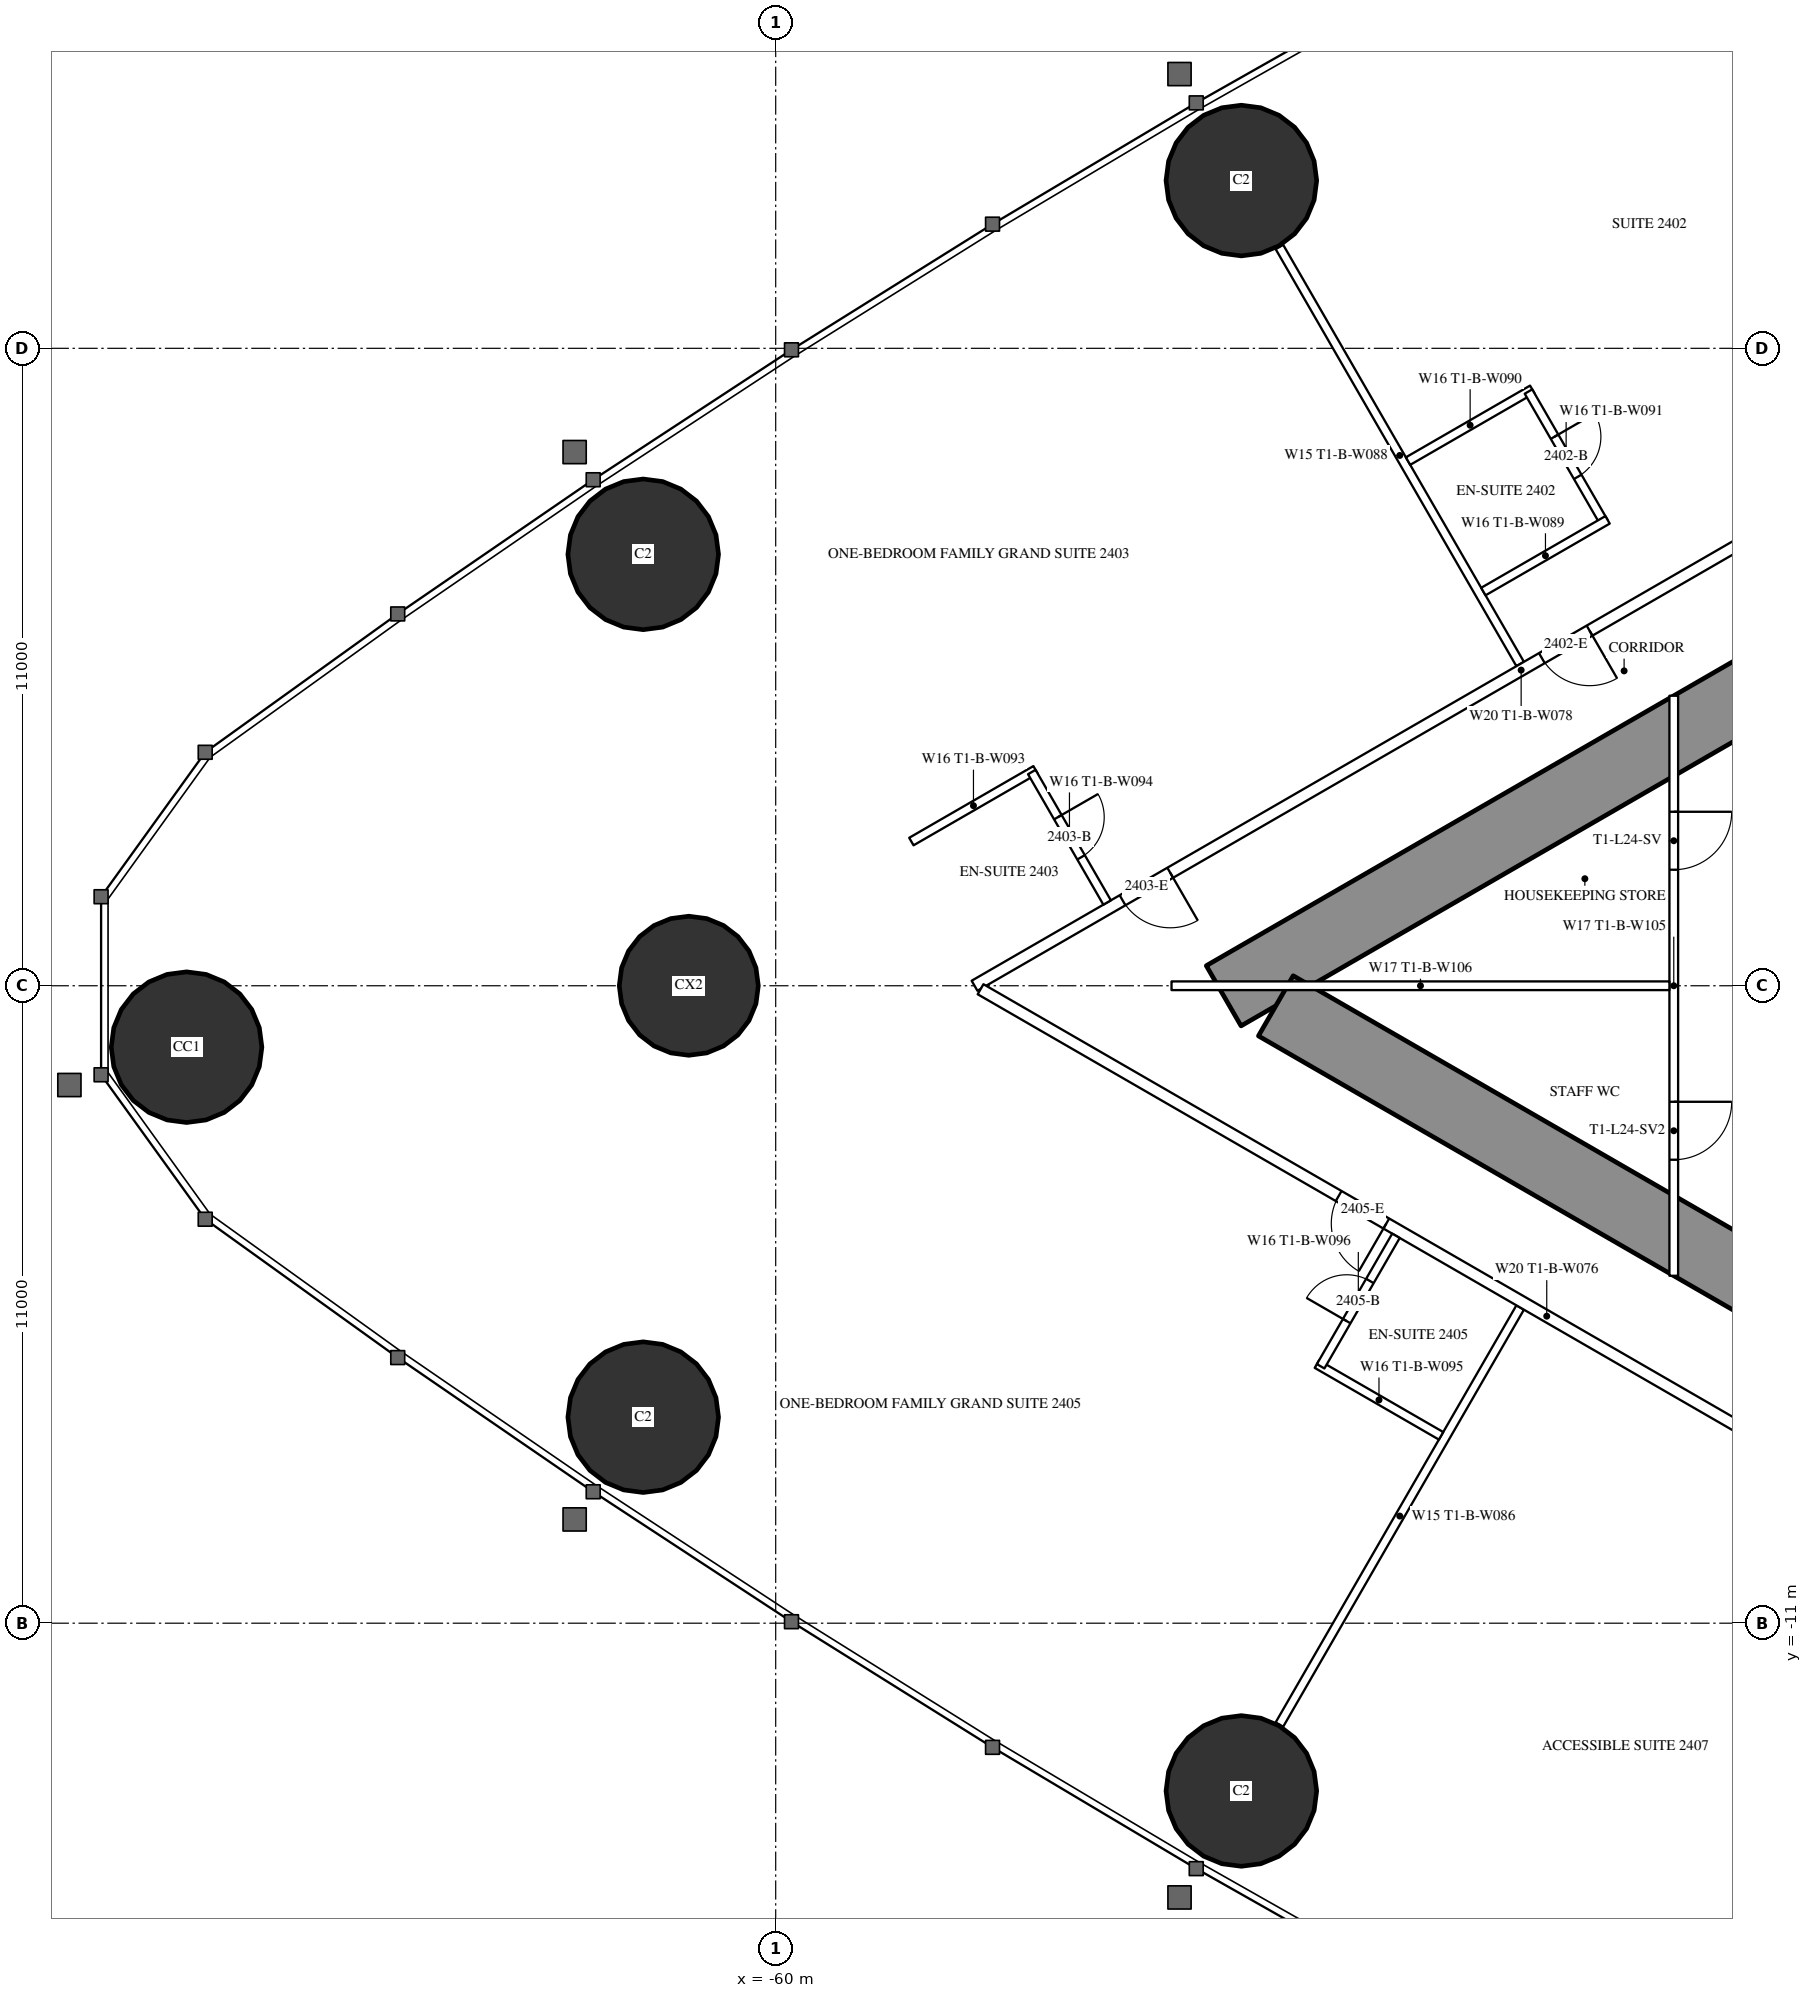
"""IFC4 building model, lengths in metres.
Left out: names, types, materials, properties, quantities, classifications, styles, units other than length and angle.
Written with IfcOpenShell. Run it as: python <this file> out.ifc"""

import sys

from ifc_helpers import new_model, si_unit, direction, frame, frame_2d, origin, origin_2d, place, context, subcontext, project, spatial, rectangle, circle, hollow_circle, extrude, element, fill, save


model = new_model("IFC4")
c1 = context("Model", 3, precision=1e-05, world=origin(), true_north=direction((0.0, 1.0)))
c2 = subcontext(c1, "Body", "Model", "MODEL_VIEW")
j1 = project(units=[si_unit("LENGTHUNIT", "METRE"), si_unit("PLANEANGLEUNIT", "RADIAN")], contexts=[c1])
p1 = place(None, origin())
s1 = spatial("IfcSite", under=j1, at=p1, CompositionType="ELEMENT")
p2 = place(p1, origin())
s2 = spatial("IfcBuilding", under=s1, at=p2, CompositionType="ELEMENT")
p3 = place(p2, frame((0.0, 0.0, 94.1)))
s3 = spatial("IfcBuildingStorey", under=s2, at=p3, CompositionType="ELEMENT", Elevation=94.1)
for number, where, z_axis, x_axis in (
    (1, (-70.168, -1.06, 0.0), (0.0, 0.0, 1.0), (1.0, 0.0, 0.0)),
    (2, (-62.287, -7.445, 0.0), (0.0, 0.0, 1.0), (1.0, 0.0, 0.0)),
    (3, (-51.963, -13.895, 0.0), (0.0, 0.0, 1.0), (1.0, 0.0, 0.0)),
    (4, (-51.963, 13.895, 0.0), (0.0, 0.0, 1.0), (1.0, 0.0, 0.0)),
    (5, (-62.287, 7.445, 0.0), (0.0, 0.0, 1.0), (1.0, 0.0, 0.0)),
):
    element("IfcColumn", number, at=place(p3, frame(where, z_axis=z_axis, x_axis=x_axis)), inside=s3, PredefinedType="COLUMN", context=c2, shape_type="SweptSolid", body=[
        extrude(hollow_circle(Radius=1.3, WallThickness=0.1, at=origin_2d()), origin(), (0.0, 0.0, 1.0), 3.5),
    ])
p4 = place(p3, frame((-61.5, 0.0, 0.0), z_axis=(0.0, 0.0, 1.0), x_axis=(1.0, 0.0, 0.0)))
e6 = element("IfcColumn", 6, at=p4, inside=s3, PredefinedType="COLUMN", context=c2, shape_type="SweptSolid", body=[
    extrude(circle(Radius=1.2, at=origin_2d()), origin(), (0.0, 0.0, 1.0), 3.5),
])
p5 = place(p3, frame((-27.2, 14.3, 0.0), z_axis=(0.0, 0.0, 1.0), x_axis=(-0.866026593062, -0.499997940104, 0.0)))
e7 = element("IfcWall", 7, at=p5, inside=s3, PredefinedType="SHEAR", context=c2, shape_type="SweptSolid", body=[
    extrude(rectangle(XDim=28.946, YDim=1.2, at=frame_2d((14.473, 0.0))), origin(), (0.0, 0.0, 1.0), 3.5),
])
p6 = place(p5, frame((4.6, 0.0, 0.0)))
e8 = element("IfcOpeningElement", 8, at=p6, cuts=e7, PredefinedType="OPENING", context=c2, shape_type="SweptSolid", body=[
    extrude(rectangle(XDim=1.0, YDim=2.2, at=frame_2d((0.5, 1.1))), frame((0.0, 0.61, 0.0), z_axis=(0.0, -1.0, 0.0), x_axis=(1.0, 0.0, 0.0)), (0.0, 0.0, 1.0), 1.22),
])
p7 = place(p5, frame((13.395, 0.0, 0.0)))
e9 = element("IfcOpeningElement", 9, at=p7, cuts=e7, PredefinedType="OPENING", context=c2, shape_type="SweptSolid", body=[
    extrude(rectangle(XDim=1.8, YDim=2.2, at=frame_2d((0.9, 1.1))), frame((0.0, 0.61, 0.0), z_axis=(0.0, -1.0, 0.0), x_axis=(1.0, 0.0, 0.0)), (0.0, 0.0, 1.0), 1.22),
])
p8 = place(p3, frame((-27.2, -14.3, 0.0), z_axis=(0.0, 0.0, 1.0), x_axis=(-0.866024021859, 0.500002393557, 0.0)))
e10 = element("IfcWall", 10, at=p8, inside=s3, PredefinedType="SHEAR", context=c2, shape_type="SweptSolid", body=[
    extrude(rectangle(XDim=27.907, YDim=1.2, at=frame_2d((13.954, 0.0))), origin(), (0.0, 0.0, 1.0), 3.5),
])
p9 = place(p8, frame((4.6, 0.0, 0.0)))
e11 = element("IfcOpeningElement", 11, at=p9, cuts=e10, PredefinedType="OPENING", context=c2, shape_type="SweptSolid", body=[
    extrude(rectangle(XDim=1.0, YDim=2.2, at=frame_2d((0.5, 1.1))), frame((0.0, 0.61, 0.0), z_axis=(0.0, -1.0, 0.0), x_axis=(1.0, 0.0, 0.0)), (0.0, 0.0, 1.0), 1.22),
])
p10 = place(p8, frame((13.395, 0.0, 0.0)))
e12 = element("IfcOpeningElement", 12, at=p10, cuts=e10, PredefinedType="OPENING", context=c2, shape_type="SweptSolid", body=[
    extrude(rectangle(XDim=1.8, YDim=2.2, at=frame_2d((0.9, 1.1))), frame((0.0, 0.61, 0.0), z_axis=(0.0, -1.0, 0.0), x_axis=(1.0, 0.0, 0.0)), (0.0, 0.0, 1.0), 1.22),
])
for number, where, z_axis, x_axis in (
    (13, (-47.151, 5.552, 0.0), (0.0, 0.0, 1.0), (-0.5, 0.866, 0.0)),
    (14, (-47.151, -5.552, 0.0), (0.0, 0.0, 1.0), (-0.5, -0.866, 0.0)),
):
    element("IfcWall", number, at=place(p3, frame(where, z_axis=z_axis, x_axis=x_axis)), inside=s3, PredefinedType="PARTITIONING", context=c2, shape_type="SweptSolid", body=[
        extrude(rectangle(XDim=8.311, YDim=0.15, at=frame_2d((4.156, 0.0))), origin(), (0.0, 0.0, 1.0), 2.2),
    ])
p11 = place(p3, frame((-37.7, 10.894, 0.0), z_axis=(0.0, 0.0, 1.0), x_axis=(-0.866027905338, -0.499995667157, 0.0)))
e15 = element("IfcWall", 15, at=p11, inside=s3, PredefinedType="PARTITIONING", context=c2, shape_type="SweptSolid", body=[
    extrude(rectangle(XDim=21.787, YDim=0.2, at=frame_2d((10.894, 0.0))), origin(), (0.0, 0.0, 1.0), 3.25),
])
p12 = place(p11, frame((17.887, 0.0, 0.0)))
e16 = element("IfcOpeningElement", 16, at=p12, cuts=e15, PredefinedType="OPENING", context=c2, shape_type="SweptSolid", body=[
    extrude(rectangle(XDim=0.95, YDim=2.2, at=frame_2d((0.475, 1.1))), frame((0.0, 0.11, 0.0), z_axis=(0.0, -1.0, 0.0), x_axis=(1.0, 0.0, 0.0)), (0.0, 0.0, 1.0), 0.22),
])
p13 = place(p11, frame((9.531, 0.0, 0.0)))
e17 = element("IfcOpeningElement", 17, at=p13, cuts=e15, PredefinedType="OPENING", context=c2, shape_type="SweptSolid", body=[
    extrude(rectangle(XDim=0.95, YDim=2.2, at=frame_2d((0.475, 1.1))), frame((0.0, 0.11, 0.0), z_axis=(0.0, -1.0, 0.0), x_axis=(1.0, 0.0, 0.0)), (0.0, 0.0, 1.0), 0.22),
])
p14 = place(p3, frame((-36.92, -11.344, 0.0), z_axis=(0.0, 0.0, 1.0), x_axis=(-0.866028313256, 0.499994960614, 0.0)))
e18 = element("IfcWall", 18, at=p14, inside=s3, PredefinedType="PARTITIONING", context=c2, shape_type="SweptSolid", body=[
    extrude(rectangle(XDim=22.568, YDim=0.2, at=frame_2d((11.284, 0.0))), origin(), (0.0, 0.0, 1.0), 3.25),
])
p15 = place(p14, frame((14.481, 0.0, 0.0)))
e19 = element("IfcOpeningElement", 19, at=p15, cuts=e18, PredefinedType="OPENING", context=c2, shape_type="SweptSolid", body=[
    extrude(rectangle(XDim=0.95, YDim=2.2, at=frame_2d((0.475, 1.1))), frame((0.0, 0.11, 0.0), z_axis=(0.0, -1.0, 0.0), x_axis=(1.0, 0.0, 0.0)), (0.0, 0.0, 1.0), 0.22),
])
p16 = place(p14, frame((3.35, 0.0, 0.0)))
e20 = element("IfcOpeningElement", 20, at=p16, cuts=e18, PredefinedType="OPENING", context=c2, shape_type="SweptSolid", body=[
    extrude(rectangle(XDim=1.0, YDim=2.2, at=frame_2d((0.5, 1.1))), frame((0.0, 0.11, 0.0), z_axis=(0.0, -1.0, 0.0), x_axis=(1.0, 0.0, 0.0)), (0.0, 0.0, 1.0), 0.22),
])
p17 = place(p3, frame((-55.515, 3.726, 0.0), z_axis=(0.0, 0.0, 1.0), x_axis=(-0.866006523861, -0.500032699561, 0.0)))
e21 = element("IfcWall", 21, at=p17, inside=s3, PredefinedType="PARTITIONING", context=c2, shape_type="SweptSolid", body=[
    extrude(rectangle(XDim=2.475, YDim=0.15, at=frame_2d((1.237, 0.0))), origin(), (0.0, 0.0, 1.0), 3.25),
])
p18 = place(p3, frame((-54.28, 1.437, 0.0), z_axis=(0.0, 0.0, 1.0), x_axis=(-0.500006934395, 0.866021400173, 0.0)))
e22 = element("IfcWall", 22, at=p18, inside=s3, PredefinedType="PARTITIONING", context=c2, shape_type="SweptSolid", body=[
    extrude(rectangle(XDim=2.6, YDim=0.15, at=frame_2d((1.3, 0.0))), origin(), (0.0, 0.0, 1.0), 3.25),
])
p19 = place(p18, frame((0.9, 0.0, 0.0)))
e23 = element("IfcOpeningElement", 23, at=p19, cuts=e22, PredefinedType="OPENING", context=c2, shape_type="SweptSolid", body=[
    extrude(rectangle(XDim=0.8, YDim=2.2, at=frame_2d((0.4, 1.1))), frame((0.0, 0.085, 0.0), z_axis=(0.0, -1.0, 0.0), x_axis=(1.0, 0.0, 0.0)), (0.0, 0.0, 1.0), 0.17),
])
p20 = place(p3, frame((-48.516, -7.767, 0.0), z_axis=(0.0, 0.0, 1.0), x_axis=(-0.866031185235, 0.4999899861, 0.0)))
e24 = element("IfcWall", 24, at=p20, inside=s3, PredefinedType="PARTITIONING", context=c2, shape_type="SweptSolid", body=[
    extrude(rectangle(XDim=2.475, YDim=0.15, at=frame_2d((1.238, 0.0))), origin(), (0.0, 0.0, 1.0), 3.25),
])
p21 = place(p3, frame((-49.295, -4.315, 0.0), z_axis=(0.0, 0.0, 1.0), x_axis=(-0.499936506574, -0.866062058628, 0.0)))
e25 = element("IfcWall", 25, at=p21, inside=s3, PredefinedType="PARTITIONING", context=c2, shape_type="SweptSolid", body=[
    extrude(rectangle(XDim=2.6, YDim=0.15, at=frame_2d((1.3, 0.0))), origin(), (0.0, 0.0, 1.0), 3.25),
])
p22 = place(p21, frame((0.9, 0.0, 0.0)))
e26 = element("IfcOpeningElement", 26, at=p22, cuts=e25, PredefinedType="OPENING", context=c2, shape_type="SweptSolid", body=[
    extrude(rectangle(XDim=0.8, YDim=2.2, at=frame_2d((0.4, 1.1))), frame((0.0, 0.085, 0.0), z_axis=(0.0, -1.0, 0.0), x_axis=(1.0, 0.0, 0.0)), (0.0, 0.0, 1.0), 0.17),
])
p23 = place(p3, frame((-46.943, 10.292, 0.0), z_axis=(0.0, 0.0, 1.0), x_axis=(-0.866006523861, -0.500032699561, 0.0)))
e27 = element("IfcWall", 27, at=p23, inside=s3, PredefinedType="PARTITIONING", context=c2, shape_type="SweptSolid", body=[
    extrude(rectangle(XDim=2.475, YDim=0.15, at=frame_2d((1.237, 0.0))), origin(), (0.0, 0.0, 1.0), 3.25),
])
p24 = place(p3, frame((-45.708, 8.002, 0.0), z_axis=(0.0, 0.0, 1.0), x_axis=(-0.500047596559, 0.865997922154, 0.0)))
e28 = element("IfcWall", 28, at=p24, inside=s3, PredefinedType="PARTITIONING", context=c2, shape_type="SweptSolid", body=[
    extrude(rectangle(XDim=2.6, YDim=0.15, at=frame_2d((1.3, 0.0))), origin(), (0.0, 0.0, 1.0), 3.25),
])
p25 = place(p24, frame((0.9, 0.0, 0.0)))
e29 = element("IfcOpeningElement", 29, at=p25, cuts=e28, PredefinedType="OPENING", context=c2, shape_type="SweptSolid", body=[
    extrude(rectangle(XDim=0.8, YDim=2.2, at=frame_2d((0.4, 1.1))), frame((0.0, 0.085, 0.0), z_axis=(0.0, -1.0, 0.0), x_axis=(1.0, 0.0, 0.0)), (0.0, 0.0, 1.0), 0.17),
])
p26 = place(p3, frame((-45.643, 8.04, 0.0), z_axis=(0.0, 0.0, 1.0), x_axis=(-0.866006523861, -0.500032699561, 0.0)))
e30 = element("IfcWall", 30, at=p26, inside=s3, PredefinedType="PARTITIONING", context=c2, shape_type="SweptSolid", body=[
    extrude(rectangle(XDim=2.475, YDim=0.15, at=frame_2d((1.237, 0.0))), origin(), (0.0, 0.0, 1.0), 3.25),
])
p27 = place(p3, frame((-44.5, 5.005, 0.0), z_axis=(0.0, 0.0, 1.0), x_axis=(0.0, -1.0, 0.0)))
e31 = element("IfcWall", 31, at=p27, inside=s3, PredefinedType="PARTITIONING", context=c2, shape_type="SweptSolid", body=[
    extrude(rectangle(XDim=10.009, YDim=0.15, at=frame_2d((5.005, 0.0))), origin(), (0.0, 0.0, 1.0), 2.45),
])
p28 = place(p27, frame((2.002, 0.0, 0.0)))
e32 = element("IfcOpeningElement", 32, at=p28, cuts=e31, PredefinedType="OPENING", context=c2, shape_type="SweptSolid", body=[
    extrude(rectangle(XDim=1.0, YDim=2.2, at=frame_2d((0.5, 1.1))), frame((0.0, 0.085, 0.0), z_axis=(0.0, -1.0, 0.0), x_axis=(1.0, 0.0, 0.0)), (0.0, 0.0, 1.0), 0.17),
])
p29 = place(p27, frame((7.007, 0.0, 0.0)))
e33 = element("IfcOpeningElement", 33, at=p29, cuts=e31, PredefinedType="OPENING", context=c2, shape_type="SweptSolid", body=[
    extrude(rectangle(XDim=1.0, YDim=2.2, at=frame_2d((0.5, 1.1))), frame((0.0, 0.085, 0.0), z_axis=(0.0, -1.0, 0.0), x_axis=(1.0, 0.0, 0.0)), (0.0, 0.0, 1.0), 0.17),
])
p30 = place(p3, frame((-44.575, 0.0, 0.0), z_axis=(0.0, 0.0, 1.0), x_axis=(-1.0, 0.0, 0.0)))
e34 = element("IfcWall", 34, at=p30, inside=s3, PredefinedType="PARTITIONING", context=c2, shape_type="SweptSolid", body=[
    extrude(rectangle(XDim=8.593, YDim=0.15, at=frame_2d((4.297, 0.0))), origin(), (0.0, 0.0, 1.0), 2.2),
])
p31 = place(p19, origin())
e35 = element("IfcDoor", 35, at=p31, inside=s3, OperationType="SINGLE_SWING_RIGHT", PredefinedType="DOOR", context=c2, shape_type="SweptSolid", body=[
    extrude(rectangle(XDim=0.8, YDim=2.2, at=frame_2d((0.4, 1.1))), frame((0.0, 0.025, 0.0), z_axis=(0.0, -1.0, 0.0), x_axis=(1.0, 0.0, 0.0)), (0.0, 0.0, 1.0), 0.05),
])
fill(e23, e35)
p32 = place(p12, origin())
e36 = element("IfcDoor", 36, at=p32, inside=s3, OperationType="SINGLE_SWING_LEFT", PredefinedType="DOOR", context=c2, shape_type="SweptSolid", body=[
    extrude(rectangle(XDim=0.95, YDim=2.2, at=frame_2d((0.475, 1.1))), frame((0.0, 0.025, 0.0), z_axis=(0.0, -1.0, 0.0), x_axis=(1.0, 0.0, 0.0)), (0.0, 0.0, 1.0), 0.05),
])
fill(e16, e36)
p33 = place(p22, origin())
e37 = element("IfcDoor", 37, at=p33, inside=s3, OperationType="SINGLE_SWING_RIGHT", PredefinedType="DOOR", context=c2, shape_type="SweptSolid", body=[
    extrude(rectangle(XDim=0.8, YDim=2.2, at=frame_2d((0.4, 1.1))), frame((0.0, 0.025, 0.0), z_axis=(0.0, -1.0, 0.0), x_axis=(1.0, 0.0, 0.0)), (0.0, 0.0, 1.0), 0.05),
])
fill(e26, e37)
p34 = place(p15, origin())
e38 = element("IfcDoor", 38, at=p34, inside=s3, OperationType="SINGLE_SWING_LEFT", PredefinedType="DOOR", context=c2, shape_type="SweptSolid", body=[
    extrude(rectangle(XDim=0.95, YDim=2.2, at=frame_2d((0.475, 1.1))), frame((0.0, 0.025, 0.0), z_axis=(0.0, -1.0, 0.0), x_axis=(1.0, 0.0, 0.0)), (0.0, 0.0, 1.0), 0.05),
])
fill(e19, e38)
p35 = place(p25, origin())
e39 = element("IfcDoor", 39, at=p35, inside=s3, OperationType="SINGLE_SWING_RIGHT", PredefinedType="DOOR", context=c2, shape_type="SweptSolid", body=[
    extrude(rectangle(XDim=0.8, YDim=2.2, at=frame_2d((0.4, 1.1))), frame((0.0, 0.025, 0.0), z_axis=(0.0, -1.0, 0.0), x_axis=(1.0, 0.0, 0.0)), (0.0, 0.0, 1.0), 0.05),
])
fill(e29, e39)
p36 = place(p13, origin())
e40 = element("IfcDoor", 40, at=p36, inside=s3, OperationType="SINGLE_SWING_LEFT", PredefinedType="DOOR", context=c2, shape_type="SweptSolid", body=[
    extrude(rectangle(XDim=0.95, YDim=2.2, at=frame_2d((0.475, 1.1))), frame((0.0, 0.025, 0.0), z_axis=(0.0, -1.0, 0.0), x_axis=(1.0, 0.0, 0.0)), (0.0, 0.0, 1.0), 0.05),
])
fill(e17, e40)
p37 = place(p28, origin())
e41 = element("IfcDoor", 41, at=p37, inside=s3, OperationType="SINGLE_SWING_LEFT", PredefinedType="DOOR", context=c2, shape_type="SweptSolid", body=[
    extrude(rectangle(XDim=1.0, YDim=2.2, at=frame_2d((0.5, 1.1))), frame((0.0, 0.025, 0.0), z_axis=(0.0, -1.0, 0.0), x_axis=(1.0, 0.0, 0.0)), (0.0, 0.0, 1.0), 0.05),
])
fill(e32, e41)
p38 = place(p29, origin())
e42 = element("IfcDoor", 42, at=p38, inside=s3, OperationType="SINGLE_SWING_LEFT", PredefinedType="DOOR", context=c2, shape_type="SweptSolid", body=[
    extrude(rectangle(XDim=1.0, YDim=2.2, at=frame_2d((0.5, 1.1))), frame((0.0, 0.025, 0.0), z_axis=(0.0, -1.0, 0.0), x_axis=(1.0, 0.0, 0.0)), (0.0, 0.0, 1.0), 0.05),
])
fill(e33, e42)
save(model, sys.argv[1])
